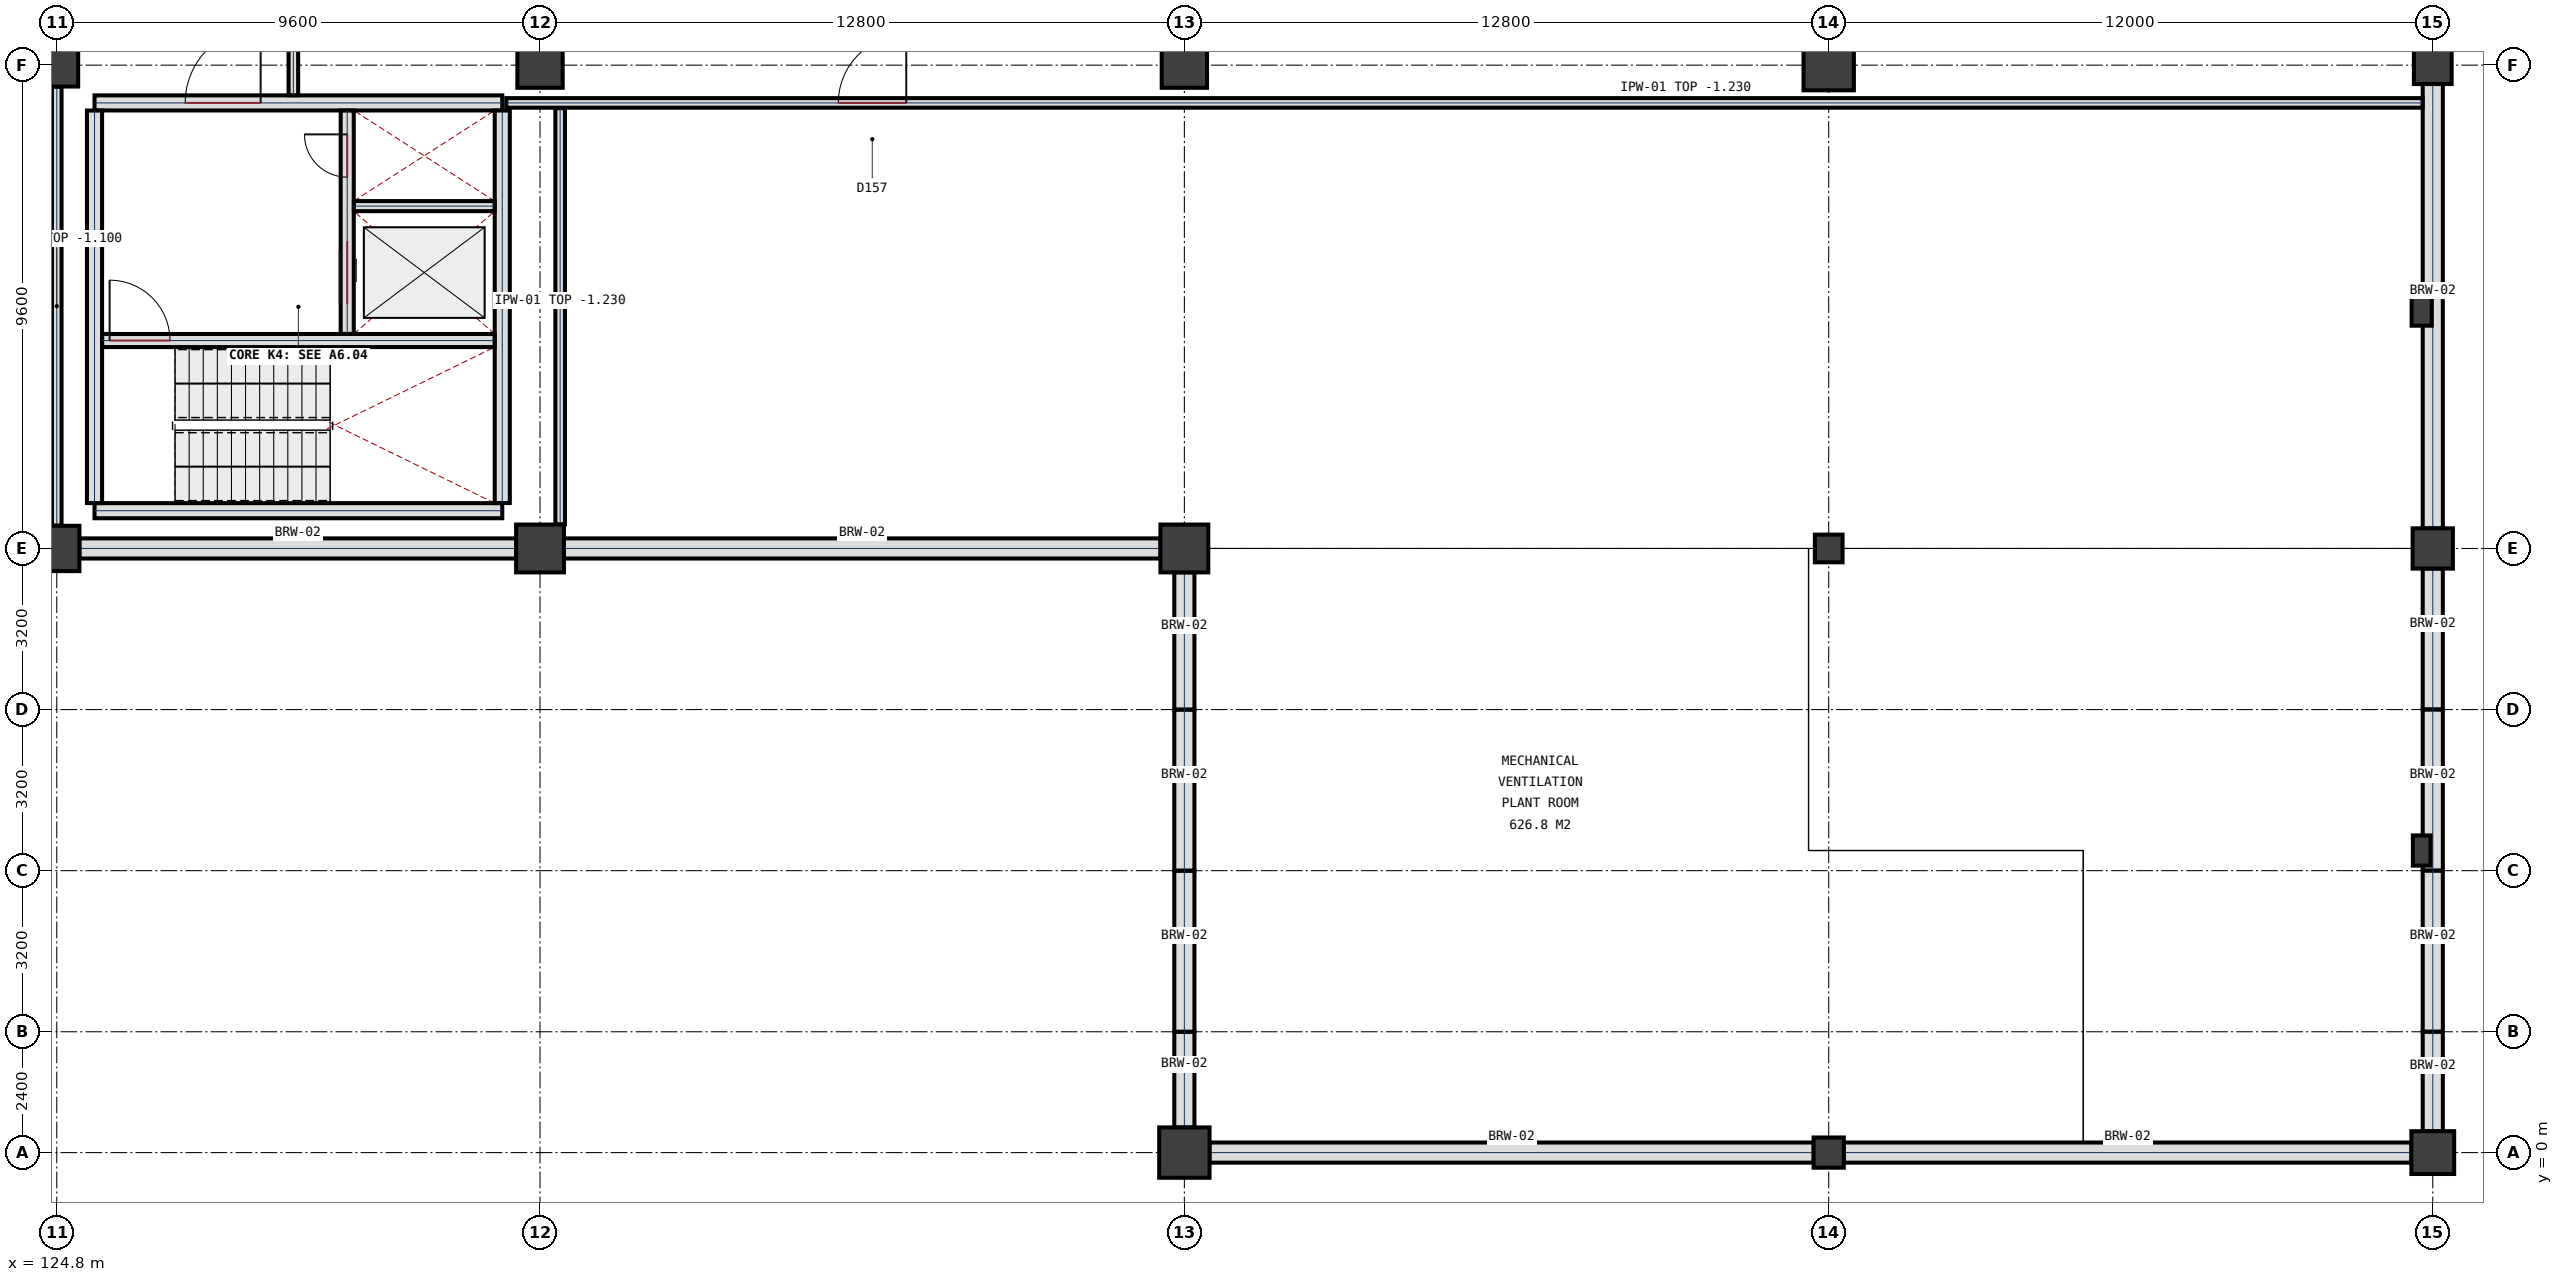
"""IFC4 building model, lengths in metres.
Left out: names, types, materials, properties, quantities, classifications, styles, units other than length and angle.
Written with IfcOpenShell. Run it as: python <this file> out.ifc"""

import sys

from ifc_helpers import new_model, si_unit, direction, frame, frame_2d, origin, origin_2d, place, context, subcontext, project, spatial, rectangle, extrude, element, fill, save


model = new_model("IFC4")
c1 = context("Model", 3, precision=1e-05, world=origin(), true_north=direction((0.0, 1.0)))
c2 = subcontext(c1, "Body", "Model", "MODEL_VIEW")
j1 = project(units=[si_unit("LENGTHUNIT", "METRE"), si_unit("PLANEANGLEUNIT", "RADIAN")], contexts=[c1])
p1 = place(None, origin())
s1 = spatial("IfcSite", under=j1, at=p1, CompositionType="ELEMENT")
p2 = place(p1, origin())
s2 = spatial("IfcBuilding", under=s1, at=p2, CompositionType="ELEMENT")
p3 = place(p2, frame((0.0, 0.0, -4.2)))
s3 = spatial("IfcBuildingStorey", under=s2, at=p3, CompositionType="ELEMENT", Elevation=-4.2)
p4 = place(p3, frame((124.8, 12.0, 0.0), z_axis=(0.0, 0.0, 1.0), x_axis=(1.0, 0.0, 0.0)))
e1 = element("IfcColumn", 1, at=p4, inside=s3, PredefinedType="COLUMN", context=c2, shape_type="SweptSolid", body=[
    extrude(rectangle(XDim=0.9, YDim=0.9, at=origin_2d()), origin(), (0.0, 0.0, 1.0), 4.2),
])
p5 = place(p3, frame((124.8, 21.6, 0.0), z_axis=(0.0, 0.0, 1.0), x_axis=(1.0, 0.0, 0.0)))
e2 = element("IfcColumn", 2, at=p5, inside=s3, PredefinedType="COLUMN", context=c2, shape_type="SweptSolid", body=[
    extrude(rectangle(XDim=0.85, YDim=0.85, at=origin_2d()), origin(), (0.0, 0.0, 1.0), 4.2),
])
p6 = place(p3, frame((134.4, 12.0, 0.0), z_axis=(0.0, 0.0, 1.0), x_axis=(1.0, 0.0, 0.0)))
e3 = element("IfcColumn", 3, at=p6, inside=s3, PredefinedType="COLUMN", context=c2, shape_type="SweptSolid", body=[
    extrude(rectangle(XDim=0.95, YDim=0.95, at=origin_2d()), origin(), (0.0, 0.0, 1.0), 4.2),
])
p7 = place(p3, frame((134.4, 21.6, 0.0), z_axis=(0.0, 0.0, 1.0), x_axis=(1.0, 0.0, 0.0)))
e4 = element("IfcColumn", 4, at=p7, inside=s3, PredefinedType="COLUMN", context=c2, shape_type="SweptSolid", body=[
    extrude(rectangle(XDim=0.9, YDim=0.9, at=origin_2d()), origin(), (0.0, 0.0, 1.0), 4.2),
])
p8 = place(p3, frame((147.2, 0.0, 0.0), z_axis=(0.0, 0.0, 1.0), x_axis=(1.0, 0.0, 0.0)))
e5 = element("IfcColumn", 5, at=p8, inside=s3, PredefinedType="COLUMN", context=c2, shape_type="SweptSolid", body=[
    extrude(rectangle(XDim=1.0, YDim=1.0, at=origin_2d()), origin(), (0.0, 0.0, 1.0), 4.2),
])
p9 = place(p3, frame((147.2, 12.0, 0.0), z_axis=(0.0, 0.0, 1.0), x_axis=(1.0, 0.0, 0.0)))
e6 = element("IfcColumn", 6, at=p9, inside=s3, PredefinedType="COLUMN", context=c2, shape_type="SweptSolid", body=[
    extrude(rectangle(XDim=0.95, YDim=0.95, at=origin_2d()), origin(), (0.0, 0.0, 1.0), 4.2),
])
p10 = place(p3, frame((147.2, 21.6, 0.0), z_axis=(0.0, 0.0, 1.0), x_axis=(1.0, 0.0, 0.0)))
e7 = element("IfcColumn", 7, at=p10, inside=s3, PredefinedType="COLUMN", context=c2, shape_type="SweptSolid", body=[
    extrude(rectangle(XDim=0.9, YDim=0.9, at=origin_2d()), origin(), (0.0, 0.0, 1.0), 4.2),
])
p11 = place(p3, frame((160.0, 0.0, 0.0), z_axis=(0.0, 0.0, 1.0), x_axis=(1.0, 0.0, 0.0)))
e8 = element("IfcColumn", 8, at=p11, inside=s3, PredefinedType="COLUMN", context=c2, shape_type="SweptSolid", body=[
    extrude(rectangle(XDim=0.6, YDim=0.6, at=origin_2d()), origin(), (0.0, 0.0, 1.0), 4.2),
])
p12 = place(p3, frame((160.0, 12.0, 0.0), z_axis=(0.0, 0.0, 1.0), x_axis=(1.0, 0.0, 0.0)))
e9 = element("IfcColumn", 9, at=p12, inside=s3, PredefinedType="COLUMN", context=c2, shape_type="SweptSolid", body=[
    extrude(rectangle(XDim=0.55, YDim=0.55, at=origin_2d()), origin(), (0.0, 0.0, 1.0), 4.2),
])
p13 = place(p3, frame((160.0, 21.6, 0.0), z_axis=(0.0, 0.0, 1.0), x_axis=(1.0, 0.0, 0.0)))
e10 = element("IfcColumn", 10, at=p13, inside=s3, PredefinedType="COLUMN", context=c2, shape_type="SweptSolid", body=[
    extrude(rectangle(XDim=1.0, YDim=1.0, at=origin_2d()), origin(), (0.0, 0.0, 1.0), 4.2),
])
p14 = place(p3, frame((172.0, 0.0, 0.0), z_axis=(0.0, 0.0, 1.0), x_axis=(1.0, 0.0, 0.0)))
e11 = element("IfcColumn", 11, at=p14, inside=s3, PredefinedType="COLUMN", context=c2, shape_type="SweptSolid", body=[
    extrude(rectangle(XDim=0.85, YDim=0.85, at=origin_2d()), origin(), (0.0, 0.0, 1.0), 4.2),
])
p15 = place(p3, frame((172.0, 12.0, 0.0), z_axis=(0.0, 0.0, 1.0), x_axis=(1.0, 0.0, 0.0)))
e12 = element("IfcColumn", 12, at=p15, inside=s3, PredefinedType="COLUMN", context=c2, shape_type="SweptSolid", body=[
    extrude(rectangle(XDim=0.8, YDim=0.8, at=origin_2d()), origin(), (0.0, 0.0, 1.0), 4.2),
])
p16 = place(p3, frame((172.0, 21.6, 0.0), z_axis=(0.0, 0.0, 1.0), x_axis=(1.0, 0.0, 0.0)))
e13 = element("IfcColumn", 13, at=p16, inside=s3, PredefinedType="COLUMN", context=c2, shape_type="SweptSolid", body=[
    extrude(rectangle(XDim=0.75, YDim=0.75, at=origin_2d()), origin(), (0.0, 0.0, 1.0), 4.2),
])
p17 = place(p3, frame((171.78, 6.0, 0.0), z_axis=(0.0, 0.0, 1.0), x_axis=(1.0, 0.0, 0.0)))
e14 = element("IfcColumn", 14, at=p17, inside=s3, PredefinedType="PILASTER", context=c2, shape_type="SweptSolid", body=[
    extrude(rectangle(XDim=0.35, YDim=0.6, at=origin_2d()), origin(), (0.0, 0.0, 1.0), 4.2),
])
p18 = place(p3, frame((171.78, 16.8, 0.0), z_axis=(0.0, 0.0, 1.0), x_axis=(1.0, 0.0, 0.0)))
e15 = element("IfcColumn", 15, at=p18, inside=s3, PredefinedType="PILASTER", context=c2, shape_type="SweptSolid", body=[
    extrude(rectangle(XDim=0.4, YDim=0.75, at=origin_2d()), origin(), (0.0, 0.0, 1.0), 4.2),
])
p19 = place(p3, frame((172.0, 21.227, 0.0), z_axis=(0.0, 0.0, 1.0), x_axis=(0.0, -1.0, 0.0)))
e16 = element("IfcWall", 16, at=p19, inside=s3, PredefinedType="USERDEFINED", context=c2, shape_type="SweptSolid", body=[
    extrude(rectangle(XDim=8.829, YDim=0.4, at=frame_2d((4.415, 0.0))), origin(), (0.0, 0.0, 1.0), 3.88),
])
p20 = place(p3, frame((172.0, 11.602, 0.0), z_axis=(0.0, 0.0, 1.0), x_axis=(0.0, -1.0, 0.0)))
e17 = element("IfcWall", 17, at=p20, inside=s3, PredefinedType="USERDEFINED", context=c2, shape_type="SweptSolid", body=[
    extrude(rectangle(XDim=2.8, YDim=0.4, at=frame_2d((1.4, 0.0))), origin(), (0.0, 0.0, 1.0), 3.92),
])
p21 = place(p3, frame((172.0, 8.798, 0.0), z_axis=(0.0, 0.0, 1.0), x_axis=(0.0, -1.0, 0.0)))
e18 = element("IfcWall", 18, at=p21, inside=s3, PredefinedType="USERDEFINED", context=c2, shape_type="SweptSolid", body=[
    extrude(rectangle(XDim=3.196, YDim=0.4, at=frame_2d((1.598, 0.0))), origin(), (0.0, 0.0, 1.0), 3.92),
])
p22 = place(p3, frame((172.0, 5.598, 0.0), z_axis=(0.0, 0.0, 1.0), x_axis=(0.0, -1.0, 0.0)))
e19 = element("IfcWall", 19, at=p22, inside=s3, PredefinedType="USERDEFINED", context=c2, shape_type="SweptSolid", body=[
    extrude(rectangle(XDim=3.196, YDim=0.4, at=frame_2d((1.598, 0.0))), origin(), (0.0, 0.0, 1.0), 3.92),
])
p23 = place(p3, frame((172.0, 2.398, 0.0), z_axis=(0.0, 0.0, 1.0), x_axis=(0.0, -1.0, 0.0)))
e20 = element("IfcWall", 20, at=p23, inside=s3, PredefinedType="USERDEFINED", context=c2, shape_type="SweptSolid", body=[
    extrude(rectangle(XDim=1.975, YDim=0.4, at=frame_2d((0.987, 0.0))), origin(), (0.0, 0.0, 1.0), 3.92),
])
p24 = place(p3, frame((171.577, 0.0, 0.0), z_axis=(0.0, 0.0, 1.0), x_axis=(-1.0, 0.0, 0.0)))
e21 = element("IfcWall", 21, at=p24, inside=s3, PredefinedType="USERDEFINED", context=c2, shape_type="SweptSolid", body=[
    extrude(rectangle(XDim=11.279, YDim=0.4, at=frame_2d((5.639, 0.0))), origin(), (0.0, 0.0, 1.0), 3.92),
])
p25 = place(p3, frame((159.702, 0.0, 0.0), z_axis=(0.0, 0.0, 1.0), x_axis=(-1.0, 0.0, 0.0)))
e22 = element("IfcWall", 22, at=p25, inside=s3, PredefinedType="USERDEFINED", context=c2, shape_type="SweptSolid", body=[
    extrude(rectangle(XDim=12.004, YDim=0.4, at=frame_2d((6.002, 0.0))), origin(), (0.0, 0.0, 1.0), 3.92),
])
p26 = place(p3, frame((147.2, 0.498, 0.0), z_axis=(0.0, 0.0, 1.0), x_axis=(0.0, 1.0, 0.0)))
e23 = element("IfcWall", 23, at=p26, inside=s3, PredefinedType="USERDEFINED", context=c2, shape_type="SweptSolid", body=[
    extrude(rectangle(XDim=1.9, YDim=0.4, at=frame_2d((0.95, 0.0))), origin(), (0.0, 0.0, 1.0), 3.92),
])
p27 = place(p3, frame((147.2, 2.402, 0.0), z_axis=(0.0, 0.0, 1.0), x_axis=(0.0, 1.0, 0.0)))
e24 = element("IfcWall", 24, at=p27, inside=s3, PredefinedType="USERDEFINED", context=c2, shape_type="SweptSolid", body=[
    extrude(rectangle(XDim=3.196, YDim=0.4, at=frame_2d((1.598, 0.0))), origin(), (0.0, 0.0, 1.0), 3.92),
])
p28 = place(p3, frame((147.2, 5.602, 0.0), z_axis=(0.0, 0.0, 1.0), x_axis=(0.0, 1.0, 0.0)))
e25 = element("IfcWall", 25, at=p28, inside=s3, PredefinedType="USERDEFINED", context=c2, shape_type="SweptSolid", body=[
    extrude(rectangle(XDim=3.196, YDim=0.4, at=frame_2d((1.598, 0.0))), origin(), (0.0, 0.0, 1.0), 3.92),
])
p29 = place(p3, frame((147.2, 8.802, 0.0), z_axis=(0.0, 0.0, 1.0), x_axis=(0.0, 1.0, 0.0)))
e26 = element("IfcWall", 26, at=p29, inside=s3, PredefinedType="USERDEFINED", context=c2, shape_type="SweptSolid", body=[
    extrude(rectangle(XDim=2.725, YDim=0.4, at=frame_2d((1.363, 0.0))), origin(), (0.0, 0.0, 1.0), 3.92),
])
p30 = place(p3, frame((146.727, 12.0, 0.0), z_axis=(0.0, 0.0, 1.0), x_axis=(-1.0, 0.0, 0.0)))
e27 = element("IfcWall", 27, at=p30, inside=s3, PredefinedType="USERDEFINED", context=c2, shape_type="SweptSolid", body=[
    extrude(rectangle(XDim=11.854, YDim=0.4, at=frame_2d((5.927, 0.0))), origin(), (0.0, 0.0, 1.0), 3.88),
])
p31 = place(p3, frame((133.927, 12.0, 0.0), z_axis=(0.0, 0.0, 1.0), x_axis=(-1.0, 0.0, 0.0)))
e28 = element("IfcWall", 28, at=p31, inside=s3, PredefinedType="USERDEFINED", context=c2, shape_type="SweptSolid", body=[
    extrude(rectangle(XDim=8.679, YDim=0.4, at=frame_2d((4.339, 0.0))), origin(), (0.0, 0.0, 1.0), 3.88),
])
p32 = place(p3, frame((133.65, 12.75, 0.0), z_axis=(0.0, 0.0, 1.0), x_axis=(-1.0, 0.0, 0.0)))
e29 = element("IfcWall", 29, at=p32, inside=s3, PredefinedType="SHEAR", context=c2, shape_type="SweptSolid", body=[
    extrude(rectangle(XDim=8.1, YDim=0.3, at=frame_2d((4.05, 0.0))), origin(), (0.0, 0.0, 1.0), 4.2),
])
p33 = place(p3, frame((125.55, 20.85, 0.0), z_axis=(0.0, 0.0, 1.0), x_axis=(1.0, 0.0, 0.0)))
e30 = element("IfcWall", 30, at=p33, inside=s3, PredefinedType="SHEAR", context=c2, shape_type="SweptSolid", body=[
    extrude(rectangle(XDim=8.1, YDim=0.3, at=frame_2d((4.05, 0.0))), origin(), (0.0, 0.0, 1.0), 4.2),
])
p34 = place(p33, frame((1.8, 0.0, 0.0)))
e31 = element("IfcOpeningElement", 31, at=p34, cuts=e30, PredefinedType="OPENING", context=c2, shape_type="SweptSolid", body=[
    extrude(rectangle(XDim=1.5, YDim=2.25, at=frame_2d((0.75, 1.125))), frame((0.0, 0.16, 0.0), z_axis=(0.0, -1.0, 0.0), x_axis=(1.0, 0.0, 0.0)), (0.0, 0.0, 1.0), 0.32),
])
for number, where, z_axis, x_axis in (
    (32, (125.55, 12.902, 0.0), (0.0, 0.0, 1.0), (0.0, 1.0, 0.0)),
    (33, (133.65, 20.698, 0.0), (0.0, 0.0, 1.0), (0.0, -1.0, 0.0)),
):
    element("IfcWall", number, at=place(p3, frame(where, z_axis=z_axis, x_axis=x_axis)), inside=s3, PredefinedType="SHEAR", context=c2, shape_type="SweptSolid", body=[
        extrude(rectangle(XDim=7.796, YDim=0.3, at=frame_2d((3.898, 0.0))), origin(), (0.0, 0.0, 1.0), 4.2),
    ])
p35 = place(p3, frame((125.702, 16.13, 0.0), z_axis=(0.0, 0.0, 1.0), x_axis=(1.0, 0.0, 0.0)))
e34 = element("IfcWall", 34, at=p35, inside=s3, PredefinedType="SHEAR", context=c2, shape_type="SweptSolid", body=[
    extrude(rectangle(XDim=7.796, YDim=0.26, at=frame_2d((3.898, 0.0))), origin(), (0.0, 0.0, 1.0), 4.2),
])
p36 = place(p35, frame((0.148, 0.0, 0.0)))
e35 = element("IfcOpeningElement", 35, at=p36, cuts=e34, PredefinedType="OPENING", context=c2, shape_type="SweptSolid", body=[
    extrude(rectangle(XDim=1.2, YDim=2.2, at=frame_2d((0.6, 1.1))), frame((0.0, 0.14, 0.0), z_axis=(0.0, -1.0, 0.0), x_axis=(1.0, 0.0, 0.0)), (0.0, 0.0, 1.0), 0.28),
])
p37 = place(p3, frame((130.57, 16.262, 0.0), z_axis=(0.0, 0.0, 1.0), x_axis=(0.0, 1.0, 0.0)))
e36 = element("IfcWall", 36, at=p37, inside=s3, PredefinedType="SHEAR", context=c2, shape_type="SweptSolid", body=[
    extrude(rectangle(XDim=4.436, YDim=0.26, at=frame_2d((2.218, 0.0))), origin(), (0.0, 0.0, 1.0), 4.2),
])
p38 = place(p37, frame((3.113, 0.0, 0.0)))
e37 = element("IfcOpeningElement", 37, at=p38, cuts=e36, PredefinedType="OPENING", context=c2, shape_type="SweptSolid", body=[
    extrude(rectangle(XDim=0.85, YDim=2.05, at=frame_2d((0.425, 1.025))), frame((0.0, 0.14, 0.0), z_axis=(0.0, -1.0, 0.0), x_axis=(1.0, 0.0, 0.0)), (0.0, 0.0, 1.0), 0.28),
])
p39 = place(p37, frame((0.593, 0.0, 0.0)))
e38 = element("IfcOpeningElement", 38, at=p39, cuts=e36, PredefinedType="OPENING", context=c2, shape_type="SweptSolid", body=[
    extrude(rectangle(XDim=1.25, YDim=2.2, at=frame_2d((0.625, 1.1))), frame((0.0, 0.14, 0.0), z_axis=(0.0, -1.0, 0.0), x_axis=(1.0, 0.0, 0.0)), (0.0, 0.0, 1.0), 0.28),
])
p40 = place(p3, frame((130.702, 18.8, 0.0), z_axis=(0.0, 0.0, 1.0), x_axis=(1.0, 0.0, 0.0)))
e39 = element("IfcWall", 39, at=p40, inside=s3, PredefinedType="PLUMBINGWALL", context=c2, shape_type="SweptSolid", body=[
    extrude(rectangle(XDim=2.796, YDim=0.2, at=frame_2d((1.398, 0.0))), origin(), (0.0, 0.0, 1.0), 3.88),
])
p41 = place(p3, frame((133.73, 20.85, 0.0), z_axis=(0.0, 0.0, 1.0), x_axis=(1.0, 0.0, 0.0)))
e40 = element("IfcWall", 40, at=p41, inside=s3, PredefinedType="PARTITIONING", context=c2, shape_type="SweptSolid", body=[
    extrude(rectangle(XDim=38.067, YDim=0.19, at=frame_2d((19.034, 0.0))), origin(), (0.0, 0.0, 1.0), 2.97),
])
p42 = place(p41, frame((6.595, 0.0, 0.0)))
e41 = element("IfcOpeningElement", 41, at=p42, cuts=e40, PredefinedType="OPENING", context=c2, shape_type="SweptSolid", body=[
    extrude(rectangle(XDim=1.35, YDim=2.25, at=frame_2d((0.675, 1.125))), frame((0.0, 0.105, 0.0), z_axis=(0.0, -1.0, 0.0), x_axis=(1.0, 0.0, 0.0)), (0.0, 0.0, 1.0), 0.21),
])
p43 = place(p3, frame((124.8, 12.453, 0.0), z_axis=(0.0, 0.0, 1.0), x_axis=(0.0, 1.0, 0.0)))
e42 = element("IfcWall", 42, at=p43, inside=s3, PredefinedType="PARTITIONING", context=c2, shape_type="SweptSolid", body=[
    extrude(rectangle(XDim=8.719, YDim=0.19, at=frame_2d((4.36, 0.0))), origin(), (0.0, 0.0, 1.0), 3.1),
])
p44 = place(p3, frame((129.5, 21.003, 0.0), z_axis=(0.0, 0.0, 1.0), x_axis=(0.0, 1.0, 0.0)))
e43 = element("IfcWall", 43, at=p44, inside=s3, PredefinedType="PARTITIONING", context=c2, shape_type="SweptSolid", body=[
    extrude(rectangle(XDim=19.692, YDim=0.19, at=frame_2d((9.846, 0.0))), origin(), (0.0, 0.0, 1.0), 3.02),
])
p45 = place(p44, frame((4.797, 0.0, 0.0)))
e44 = element("IfcOpeningElement", 44, at=p45, cuts=e43, PredefinedType="OPENING", context=c2, shape_type="SweptSolid", body=[
    extrude(rectangle(XDim=1.2, YDim=2.2, at=frame_2d((0.6, 1.1))), frame((0.0, 0.105, 0.0), z_axis=(0.0, -1.0, 0.0), x_axis=(1.0, 0.0, 0.0)), (0.0, 0.0, 1.0), 0.21),
])
p46 = place(p3, frame((134.8, 12.478, 0.0), z_axis=(0.0, 0.0, 1.0), x_axis=(0.0, 1.0, 0.0)))
e45 = element("IfcWall", 45, at=p46, inside=s3, PredefinedType="PARTITIONING", context=c2, shape_type="SweptSolid", body=[
    extrude(rectangle(XDim=8.267, YDim=0.19, at=frame_2d((4.134, 0.0))), origin(), (0.0, 0.0, 1.0), 2.97),
])
p47 = place(p34, origin())
e46 = element("IfcDoor", 46, at=p47, inside=s3, OperationType="SINGLE_SWING_RIGHT", PredefinedType="DOOR", context=c2, shape_type="SweptSolid", body=[
    extrude(rectangle(XDim=1.5, YDim=2.25, at=frame_2d((0.75, 1.125))), frame((0.0, 0.032, 0.0), z_axis=(0.0, -1.0, 0.0), x_axis=(1.0, 0.0, 0.0)), (0.0, 0.0, 1.0), 0.065),
])
fill(e31, e46)
p48 = place(p36, origin())
e47 = element("IfcDoor", 47, at=p48, inside=s3, OperationType="SINGLE_SWING_LEFT", PredefinedType="DOOR", context=c2, shape_type="SweptSolid", body=[
    extrude(rectangle(XDim=1.2, YDim=2.2, at=frame_2d((0.6, 1.1))), frame((0.0, 0.032, 0.0), z_axis=(0.0, -1.0, 0.0), x_axis=(1.0, 0.0, 0.0)), (0.0, 0.0, 1.0), 0.065),
])
fill(e35, e47)
p49 = place(p38, origin())
e48 = element("IfcDoor", 48, at=p49, inside=s3, OperationType="SINGLE_SWING_RIGHT", PredefinedType="DOOR", context=c2, shape_type="SweptSolid", body=[
    extrude(rectangle(XDim=0.85, YDim=2.05, at=frame_2d((0.425, 1.025))), frame((0.0, 0.032, 0.0), z_axis=(0.0, -1.0, 0.0), x_axis=(1.0, 0.0, 0.0)), (0.0, 0.0, 1.0), 0.065),
])
fill(e37, e48)
p50 = place(p39, origin())
e49 = element("IfcDoor", 49, at=p50, inside=s3, OperationType="SLIDING_TO_LEFT", PredefinedType="DOOR", context=c2, shape_type="SweptSolid", body=[
    extrude(rectangle(XDim=1.25, YDim=2.2, at=frame_2d((0.625, 1.1))), frame((0.0, 0.032, 0.0), z_axis=(0.0, -1.0, 0.0), x_axis=(1.0, 0.0, 0.0)), (0.0, 0.0, 1.0), 0.065),
])
fill(e38, e49)
p51 = place(p42, origin())
e50 = element("IfcDoor", 50, at=p51, inside=s3, OperationType="SINGLE_SWING_RIGHT", PredefinedType="DOOR", context=c2, shape_type="SweptSolid", body=[
    extrude(rectangle(XDim=1.35, YDim=2.25, at=frame_2d((0.675, 1.125))), frame((0.0, 0.032, 0.0), z_axis=(0.0, -1.0, 0.0), x_axis=(1.0, 0.0, 0.0)), (0.0, 0.0, 1.0), 0.065),
])
fill(e41, e50)
save(model, sys.argv[1])
